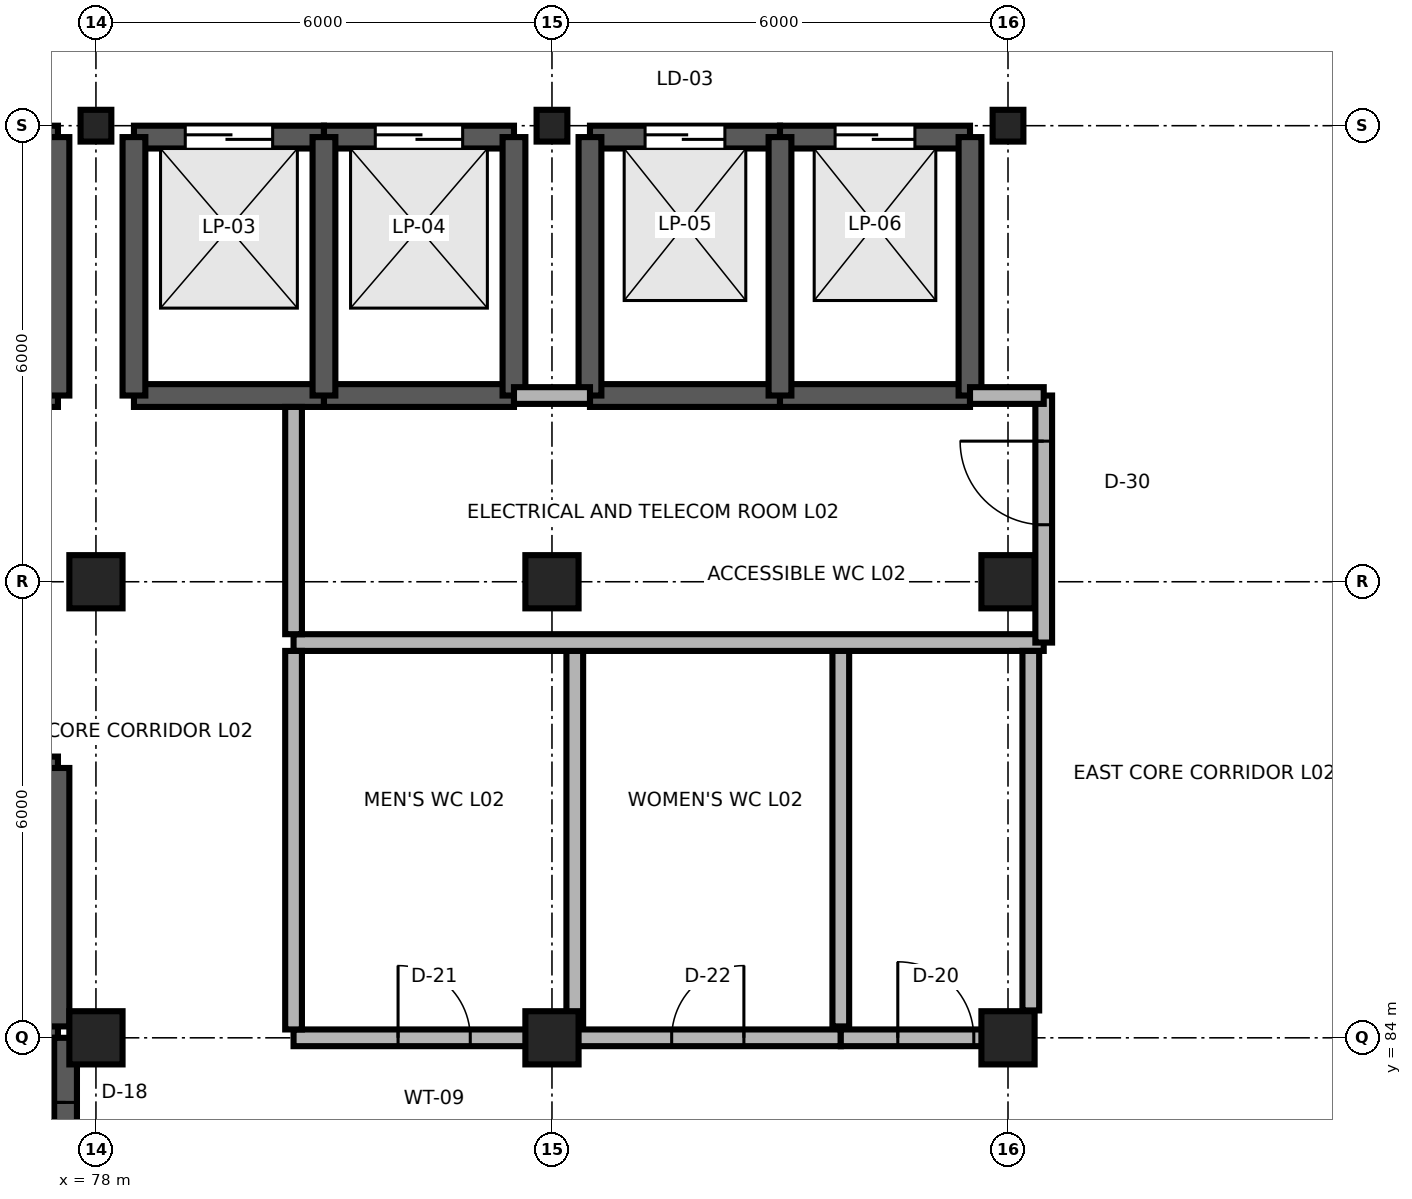
"""IFC4 building model, lengths in metres.
Left out: names, types, materials, properties, quantities, classifications, styles, units other than length and angle.
Written with IfcOpenShell. Run it as: python <this file> out.ifc"""

import sys

from ifc_helpers import new_model, si_unit, direction, frame, frame_2d, origin, origin_2d, place, context, subcontext, project, spatial, rectangle, i_section, extrude, element, fill, save


model = new_model("IFC4")
c1 = context("Model", 3, precision=1e-05, world=origin(), true_north=direction((0.0, 1.0)))
c2 = subcontext(c1, "Body", "Model", "MODEL_VIEW")
j1 = project(units=[si_unit("LENGTHUNIT", "METRE"), si_unit("PLANEANGLEUNIT", "RADIAN")], contexts=[c1])
p1 = place(None, origin())
s1 = spatial("IfcSite", under=j1, at=p1, CompositionType="ELEMENT")
p2 = place(p1, origin())
s2 = spatial("IfcBuilding", under=s1, at=p2, CompositionType="ELEMENT")
p3 = place(p2, frame((0.0, 0.0, 6.0)))
s3 = spatial("IfcBuildingStorey", under=s2, at=p3, CompositionType="ELEMENT", Elevation=6.0)
for number, where, z_axis, x_axis in (
    (1, (78.0, 84.0, 0.0), (0.0, 0.0, 1.0), (1.0, 0.0, 0.0)),
    (2, (84.0, 84.0, 0.0), (0.0, 0.0, 1.0), (1.0, 0.0, 0.0)),
    (3, (90.0, 84.0, 0.0), (0.0, 0.0, 1.0), (1.0, 0.0, 0.0)),
    (4, (78.0, 90.0, 0.0), (0.0, 0.0, 1.0), (1.0, 0.0, 0.0)),
    (5, (84.0, 90.0, 0.0), (0.0, 0.0, 1.0), (1.0, 0.0, 0.0)),
    (6, (90.0, 90.0, 0.0), (0.0, 0.0, 1.0), (1.0, 0.0, 0.0)),
):
    element("IfcColumn", number, at=place(p3, frame(where, z_axis=z_axis, x_axis=x_axis)), inside=s3, PredefinedType="COLUMN", context=c2, shape_type="SweptSolid", body=[
        extrude(rectangle(XDim=0.7, YDim=0.7, at=origin_2d()), origin(), (0.0, 0.0, 1.0), 6.0),
    ])
for number, where, z_axis, x_axis in (
    (7, (78.0, 96.0, 0.0), (0.0, 0.0, 1.0), (1.0, 0.0, 0.0)),
    (8, (84.0, 96.0, 0.0), (0.0, 0.0, 1.0), (1.0, 0.0, 0.0)),
    (9, (90.0, 96.0, 0.0), (0.0, 0.0, 1.0), (1.0, 0.0, 0.0)),
):
    element("IfcColumn", number, at=place(p3, frame(where, z_axis=z_axis, x_axis=x_axis)), inside=s3, PredefinedType="COLUMN", context=c2, shape_type="SweptSolid", body=[
        extrude(i_section(OverallWidth=0.405, OverallDepth=0.418, WebThickness=0.02, FlangeThickness=0.03, FilletRadius=0.022, at=origin_2d()), origin(), (0.0, 0.0, 1.0), 6.0),
    ])
p4 = place(p3, frame((75.0, 84.15, 0.0), z_axis=(0.0, 0.0, 1.0), x_axis=(1.0, 0.0, 0.0)))
e10 = element("IfcWall", 10, at=p4, inside=s3, PredefinedType="SHEAR", context=c2, shape_type="SweptSolid", body=[
    extrude(rectangle(XDim=2.5, YDim=0.3, at=frame_2d((1.25, 0.0))), origin(), (0.0, 0.0, 1.0), 5.76),
])
p5 = place(p4, frame((0.7, 0.0, 0.0)))
e11 = element("IfcOpeningElement", 11, at=p5, cuts=e10, PredefinedType="OPENING", context=c2, shape_type="SweptSolid", body=[
    extrude(rectangle(XDim=1.1, YDim=2.1, at=frame_2d((0.55, 1.05))), frame((0.0, 0.165, 0.0), z_axis=(0.0, -1.0, 0.0), x_axis=(1.0, 0.0, 0.0)), (0.0, 0.0, 1.0), 0.33),
])
p6 = place(p3, frame((75.0, 87.55, 0.0), z_axis=(0.0, 0.0, 1.0), x_axis=(1.0, 0.0, 0.0)))
e12 = element("IfcWall", 12, at=p6, inside=s3, PredefinedType="SHEAR", context=c2, shape_type="SweptSolid", body=[
    extrude(rectangle(XDim=2.5, YDim=0.3, at=frame_2d((1.25, 0.0))), origin(), (0.0, 0.0, 1.0), 5.76),
])
p7 = place(p3, frame((77.5, 84.15, 0.0), z_axis=(0.0, 0.0, 1.0), x_axis=(0.0, 1.0, 0.0)))
e13 = element("IfcWall", 13, at=p7, inside=s3, PredefinedType="SHEAR", context=c2, shape_type="SweptSolid", body=[
    extrude(rectangle(XDim=3.4, YDim=0.3, at=frame_2d((1.7, 0.0))), origin(), (0.0, 0.0, 1.0), 5.76),
])
p8 = place(p3, frame((75.0, 95.85, 0.0), z_axis=(0.0, 0.0, 1.0), x_axis=(1.0, 0.0, 0.0)))
e14 = element("IfcWall", 14, at=p8, inside=s3, PredefinedType="SHEAR", context=c2, shape_type="SweptSolid", body=[
    extrude(rectangle(XDim=2.5, YDim=0.3, at=frame_2d((1.25, 0.0))), origin(), (0.0, 0.0, 1.0), 5.76),
])
p9 = place(p8, frame((0.675, 0.0, 0.0)))
e15 = element("IfcOpeningElement", 15, at=p9, cuts=e14, PredefinedType="OPENING", context=c2, shape_type="SweptSolid", body=[
    extrude(rectangle(XDim=1.15, YDim=2.15, at=frame_2d((0.575, 1.075))), frame((0.0, 0.165, 0.0), z_axis=(0.0, -1.0, 0.0), x_axis=(1.0, 0.0, 0.0)), (0.0, 0.0, 1.0), 0.33),
])
p10 = place(p3, frame((75.0, 92.45, 0.0), z_axis=(0.0, 0.0, 1.0), x_axis=(1.0, 0.0, 0.0)))
e16 = element("IfcWall", 16, at=p10, inside=s3, PredefinedType="SHEAR", context=c2, shape_type="SweptSolid", body=[
    extrude(rectangle(XDim=2.5, YDim=0.3, at=frame_2d((1.25, 0.0))), origin(), (0.0, 0.0, 1.0), 5.76),
])
p11 = place(p3, frame((77.5, 92.45, 0.0), z_axis=(0.0, 0.0, 1.0), x_axis=(0.0, 1.0, 0.0)))
e17 = element("IfcWall", 17, at=p11, inside=s3, PredefinedType="SHEAR", context=c2, shape_type="SweptSolid", body=[
    extrude(rectangle(XDim=3.4, YDim=0.3, at=frame_2d((1.7, 0.0))), origin(), (0.0, 0.0, 1.0), 5.76),
])
p12 = place(p3, frame((78.5, 95.85, 0.0), z_axis=(0.0, 0.0, 1.0), x_axis=(1.0, 0.0, 0.0)))
e18 = element("IfcWall", 18, at=p12, inside=s3, PredefinedType="SHEAR", context=c2, shape_type="SweptSolid", body=[
    extrude(rectangle(XDim=2.5, YDim=0.3, at=frame_2d((1.25, 0.0))), origin(), (0.0, 0.0, 1.0), 5.76),
])
p13 = place(p12, frame((0.675, 0.0, 0.0)))
e19 = element("IfcOpeningElement", 19, at=p13, cuts=e18, PredefinedType="OPENING", context=c2, shape_type="SweptSolid", body=[
    extrude(rectangle(XDim=1.15, YDim=2.15, at=frame_2d((0.575, 1.075))), frame((0.0, 0.165, 0.0), z_axis=(0.0, -1.0, 0.0), x_axis=(1.0, 0.0, 0.0)), (0.0, 0.0, 1.0), 0.33),
])
p14 = place(p3, frame((78.5, 92.45, 0.0), z_axis=(0.0, 0.0, 1.0), x_axis=(1.0, 0.0, 0.0)))
e20 = element("IfcWall", 20, at=p14, inside=s3, PredefinedType="SHEAR", context=c2, shape_type="SweptSolid", body=[
    extrude(rectangle(XDim=2.5, YDim=0.3, at=frame_2d((1.25, 0.0))), origin(), (0.0, 0.0, 1.0), 5.76),
])
p15 = place(p3, frame((78.5, 92.45, 0.0), z_axis=(0.0, 0.0, 1.0), x_axis=(0.0, 1.0, 0.0)))
e21 = element("IfcWall", 21, at=p15, inside=s3, PredefinedType="SHEAR", context=c2, shape_type="SweptSolid", body=[
    extrude(rectangle(XDim=3.4, YDim=0.3, at=frame_2d((1.7, 0.0))), origin(), (0.0, 0.0, 1.0), 5.76),
])
p16 = place(p3, frame((81.0, 95.85, 0.0), z_axis=(0.0, 0.0, 1.0), x_axis=(1.0, 0.0, 0.0)))
e22 = element("IfcWall", 22, at=p16, inside=s3, PredefinedType="SHEAR", context=c2, shape_type="SweptSolid", body=[
    extrude(rectangle(XDim=2.5, YDim=0.3, at=frame_2d((1.25, 0.0))), origin(), (0.0, 0.0, 1.0), 5.76),
])
p17 = place(p16, frame((0.675, 0.0, 0.0)))
e23 = element("IfcOpeningElement", 23, at=p17, cuts=e22, PredefinedType="OPENING", context=c2, shape_type="SweptSolid", body=[
    extrude(rectangle(XDim=1.15, YDim=2.15, at=frame_2d((0.575, 1.075))), frame((0.0, 0.165, 0.0), z_axis=(0.0, -1.0, 0.0), x_axis=(1.0, 0.0, 0.0)), (0.0, 0.0, 1.0), 0.33),
])
p18 = place(p3, frame((81.0, 92.45, 0.0), z_axis=(0.0, 0.0, 1.0), x_axis=(1.0, 0.0, 0.0)))
e24 = element("IfcWall", 24, at=p18, inside=s3, PredefinedType="SHEAR", context=c2, shape_type="SweptSolid", body=[
    extrude(rectangle(XDim=2.5, YDim=0.3, at=frame_2d((1.25, 0.0))), origin(), (0.0, 0.0, 1.0), 5.76),
])
for number, where, z_axis, x_axis in (
    (25, (81.0, 92.45, 0.0), (0.0, 0.0, 1.0), (0.0, 1.0, 0.0)),
    (26, (83.5, 92.45, 0.0), (0.0, 0.0, 1.0), (0.0, 1.0, 0.0)),
):
    element("IfcWall", number, at=place(p3, frame(where, z_axis=z_axis, x_axis=x_axis)), inside=s3, PredefinedType="SHEAR", context=c2, shape_type="SweptSolid", body=[
        extrude(rectangle(XDim=3.4, YDim=0.3, at=frame_2d((1.7, 0.0))), origin(), (0.0, 0.0, 1.0), 5.76),
    ])
p19 = place(p3, frame((84.5, 95.85, 0.0), z_axis=(0.0, 0.0, 1.0), x_axis=(1.0, 0.0, 0.0)))
e27 = element("IfcWall", 27, at=p19, inside=s3, PredefinedType="SHEAR", context=c2, shape_type="SweptSolid", body=[
    extrude(rectangle(XDim=2.5, YDim=0.3, at=frame_2d((1.25, 0.0))), origin(), (0.0, 0.0, 1.0), 5.76),
])
p20 = place(p19, frame((0.725, 0.0, 0.0)))
e28 = element("IfcOpeningElement", 28, at=p20, cuts=e27, PredefinedType="OPENING", context=c2, shape_type="SweptSolid", body=[
    extrude(rectangle(XDim=1.05, YDim=2.1, at=frame_2d((0.525, 1.05))), frame((0.0, 0.165, 0.0), z_axis=(0.0, -1.0, 0.0), x_axis=(1.0, 0.0, 0.0)), (0.0, 0.0, 1.0), 0.33),
])
p21 = place(p3, frame((84.5, 92.45, 0.0), z_axis=(0.0, 0.0, 1.0), x_axis=(1.0, 0.0, 0.0)))
e29 = element("IfcWall", 29, at=p21, inside=s3, PredefinedType="SHEAR", context=c2, shape_type="SweptSolid", body=[
    extrude(rectangle(XDim=2.5, YDim=0.3, at=frame_2d((1.25, 0.0))), origin(), (0.0, 0.0, 1.0), 5.76),
])
p22 = place(p3, frame((84.5, 92.45, 0.0), z_axis=(0.0, 0.0, 1.0), x_axis=(0.0, 1.0, 0.0)))
e30 = element("IfcWall", 30, at=p22, inside=s3, PredefinedType="SHEAR", context=c2, shape_type="SweptSolid", body=[
    extrude(rectangle(XDim=3.4, YDim=0.3, at=frame_2d((1.7, 0.0))), origin(), (0.0, 0.0, 1.0), 5.76),
])
p23 = place(p3, frame((87.0, 95.85, 0.0), z_axis=(0.0, 0.0, 1.0), x_axis=(1.0, 0.0, 0.0)))
e31 = element("IfcWall", 31, at=p23, inside=s3, PredefinedType="SHEAR", context=c2, shape_type="SweptSolid", body=[
    extrude(rectangle(XDim=2.5, YDim=0.3, at=frame_2d((1.25, 0.0))), origin(), (0.0, 0.0, 1.0), 5.76),
])
p24 = place(p23, frame((0.725, 0.0, 0.0)))
e32 = element("IfcOpeningElement", 32, at=p24, cuts=e31, PredefinedType="OPENING", context=c2, shape_type="SweptSolid", body=[
    extrude(rectangle(XDim=1.05, YDim=2.1, at=frame_2d((0.525, 1.05))), frame((0.0, 0.165, 0.0), z_axis=(0.0, -1.0, 0.0), x_axis=(1.0, 0.0, 0.0)), (0.0, 0.0, 1.0), 0.33),
])
p25 = place(p3, frame((87.0, 92.45, 0.0), z_axis=(0.0, 0.0, 1.0), x_axis=(1.0, 0.0, 0.0)))
e33 = element("IfcWall", 33, at=p25, inside=s3, PredefinedType="SHEAR", context=c2, shape_type="SweptSolid", body=[
    extrude(rectangle(XDim=2.5, YDim=0.3, at=frame_2d((1.25, 0.0))), origin(), (0.0, 0.0, 1.0), 5.76),
])
for number, where, z_axis, x_axis in (
    (34, (87.0, 92.45, 0.0), (0.0, 0.0, 1.0), (0.0, 1.0, 0.0)),
    (35, (89.5, 92.45, 0.0), (0.0, 0.0, 1.0), (0.0, 1.0, 0.0)),
):
    element("IfcWall", number, at=place(p3, frame(where, z_axis=z_axis, x_axis=x_axis)), inside=s3, PredefinedType="SHEAR", context=c2, shape_type="SweptSolid", body=[
        extrude(rectangle(XDim=3.4, YDim=0.3, at=frame_2d((1.7, 0.0))), origin(), (0.0, 0.0, 1.0), 5.76),
    ])
p26 = place(p3, frame((77.6, 81.0, 0.0), z_axis=(0.0, 0.0, 1.0), x_axis=(0.0, 1.0, 0.0)))
e36 = element("IfcWall", 36, at=p26, inside=s3, PredefinedType="SHEAR", context=c2, shape_type="SweptSolid", body=[
    extrude(rectangle(XDim=3.0, YDim=0.3, at=frame_2d((1.5, 0.0))), origin(), (0.0, 0.0, 1.0), 5.76),
])
p27 = place(p26, frame((0.85, 0.0, 0.0)))
e37 = element("IfcOpeningElement", 37, at=p27, cuts=e36, PredefinedType="OPENING", context=c2, shape_type="SweptSolid", body=[
    extrude(rectangle(XDim=1.3, YDim=2.2, at=frame_2d((0.65, 1.1))), frame((0.0, 0.165, 0.0), z_axis=(0.0, -1.0, 0.0), x_axis=(1.0, 0.0, 0.0)), (0.0, 0.0, 1.0), 0.33),
])
p28 = place(p3, frame((80.6, 84.0, 0.0), z_axis=(0.0, 0.0, 1.0), x_axis=(1.0, 0.0, 0.0)))
e38 = element("IfcWall", 38, at=p28, inside=s3, PredefinedType="PARTITIONING", context=c2, shape_type="SweptSolid", body=[
    extrude(rectangle(XDim=3.7, YDim=0.22, at=frame_2d((1.85, 0.0))), origin(), (0.0, 0.0, 1.0), 5.32),
])
p29 = place(p28, frame((1.375, 0.0, 0.0)))
e39 = element("IfcOpeningElement", 39, at=p29, cuts=e38, PredefinedType="OPENING", context=c2, shape_type="SweptSolid", body=[
    extrude(rectangle(XDim=0.95, YDim=2.15, at=frame_2d((0.475, 1.075))), frame((0.0, 0.125, 0.0), z_axis=(0.0, -1.0, 0.0), x_axis=(1.0, 0.0, 0.0)), (0.0, 0.0, 1.0), 0.25),
])
p30 = place(p3, frame((84.3, 84.0, 0.0), z_axis=(0.0, 0.0, 1.0), x_axis=(1.0, 0.0, 0.0)))
e40 = element("IfcWall", 40, at=p30, inside=s3, PredefinedType="PARTITIONING", context=c2, shape_type="SweptSolid", body=[
    extrude(rectangle(XDim=3.5, YDim=0.22, at=frame_2d((1.75, 0.0))), origin(), (0.0, 0.0, 1.0), 5.32),
])
p31 = place(p30, frame((1.275, 0.0, 0.0)))
e41 = element("IfcOpeningElement", 41, at=p31, cuts=e40, PredefinedType="OPENING", context=c2, shape_type="SweptSolid", body=[
    extrude(rectangle(XDim=0.95, YDim=2.1, at=frame_2d((0.475, 1.05))), frame((0.0, 0.125, 0.0), z_axis=(0.0, -1.0, 0.0), x_axis=(1.0, 0.0, 0.0)), (0.0, 0.0, 1.0), 0.25),
])
p32 = place(p3, frame((87.8, 84.0, 0.0), z_axis=(0.0, 0.0, 1.0), x_axis=(1.0, 0.0, 0.0)))
e42 = element("IfcWall", 42, at=p32, inside=s3, PredefinedType="PARTITIONING", context=c2, shape_type="SweptSolid", body=[
    extrude(rectangle(XDim=2.5, YDim=0.22, at=frame_2d((1.25, 0.0))), origin(), (0.0, 0.0, 1.0), 5.32),
])
p33 = place(p32, frame((0.75, 0.0, 0.0)))
e43 = element("IfcOpeningElement", 43, at=p33, cuts=e42, PredefinedType="OPENING", context=c2, shape_type="SweptSolid", body=[
    extrude(rectangle(XDim=1.0, YDim=2.15, at=frame_2d((0.5, 1.075))), frame((0.0, 0.125, 0.0), z_axis=(0.0, -1.0, 0.0), x_axis=(1.0, 0.0, 0.0)), (0.0, 0.0, 1.0), 0.25),
])
for number, where, z_axis, x_axis in (
    (44, (84.3, 84.15, 0.0), (0.0, 0.0, 1.0), (0.0, 1.0, 0.0)),
    (45, (87.8, 84.15, 0.0), (0.0, 0.0, 1.0), (0.0, 1.0, 0.0)),
):
    element("IfcWall", number, at=place(p3, frame(where, z_axis=z_axis, x_axis=x_axis)), inside=s3, PredefinedType="PARTITIONING", context=c2, shape_type="SweptSolid", body=[
        extrude(rectangle(XDim=5.0, YDim=0.22, at=frame_2d((2.5, 0.0))), origin(), (0.0, 0.0, 1.0), 5.76),
    ])
p34 = place(p3, frame((80.6, 89.2, 0.0), z_axis=(0.0, 0.0, 1.0), x_axis=(1.0, 0.0, 0.0)))
e46 = element("IfcWall", 46, at=p34, inside=s3, PredefinedType="PARTITIONING", context=c2, shape_type="SweptSolid", body=[
    extrude(rectangle(XDim=9.87, YDim=0.22, at=frame_2d((4.935, 0.0))), origin(), (0.0, 0.0, 1.0), 5.76),
])
p35 = place(p3, frame((90.47, 89.2, 0.0), z_axis=(0.0, 0.0, 1.0), x_axis=(0.0, 1.0, 0.0)))
e47 = element("IfcWall", 47, at=p35, inside=s3, PredefinedType="PARTITIONING", context=c2, shape_type="SweptSolid", body=[
    extrude(rectangle(XDim=3.25, YDim=0.22, at=frame_2d((1.625, 0.0))), origin(), (0.0, 0.0, 1.0), 5.76),
])
p36 = place(p35, frame((1.55, 0.0, 0.0)))
e48 = element("IfcOpeningElement", 48, at=p36, cuts=e47, PredefinedType="OPENING", context=c2, shape_type="SweptSolid", body=[
    extrude(rectangle(XDim=1.1, YDim=2.15, at=frame_2d((0.55, 1.075))), frame((0.0, 0.125, 0.0), z_axis=(0.0, -1.0, 0.0), x_axis=(1.0, 0.0, 0.0)), (0.0, 0.0, 1.0), 0.25),
])
p37 = place(p3, frame((80.6, 84.11, 0.0), z_axis=(0.0, 0.0, 1.0), x_axis=(0.0, 1.0, 0.0)))
e49 = element("IfcWall", 49, at=p37, inside=s3, PredefinedType="PARTITIONING", context=c2, shape_type="SweptSolid", body=[
    extrude(rectangle(XDim=4.98, YDim=0.22, at=frame_2d((2.49, 0.0))), origin(), (0.0, 0.0, 1.0), 5.76),
])
p38 = place(p3, frame((90.3, 84.36, 0.0), z_axis=(0.0, 0.0, 1.0), x_axis=(0.0, 1.0, 0.0)))
e50 = element("IfcWall", 50, at=p38, inside=s3, PredefinedType="PARTITIONING", context=c2, shape_type="SweptSolid", body=[
    extrude(rectangle(XDim=4.73, YDim=0.22, at=frame_2d((2.365, 0.0))), origin(), (0.0, 0.0, 1.0), 5.76),
])
p39 = place(p3, frame((80.6, 89.31, 0.0), z_axis=(0.0, 0.0, 1.0), x_axis=(0.0, 1.0, 0.0)))
e51 = element("IfcWall", 51, at=p39, inside=s3, PredefinedType="PARTITIONING", context=c2, shape_type="SweptSolid", body=[
    extrude(rectangle(XDim=2.99, YDim=0.22, at=frame_2d((1.495, 0.0))), origin(), (0.0, 0.0, 1.0), 5.76),
])
p40 = place(p3, frame((83.5, 92.45, 0.0), z_axis=(0.0, 0.0, 1.0), x_axis=(1.0, 0.0, 0.0)))
e52 = element("IfcWall", 52, at=p40, inside=s3, PredefinedType="PARTITIONING", context=c2, shape_type="SweptSolid", body=[
    extrude(rectangle(XDim=1.0, YDim=0.22, at=frame_2d((0.5, 0.0))), origin(), (0.0, 0.0, 1.0), 5.76),
])
p41 = place(p3, frame((89.5, 92.45, 0.0), z_axis=(0.0, 0.0, 1.0), x_axis=(1.0, 0.0, 0.0)))
e53 = element("IfcWall", 53, at=p41, inside=s3, PredefinedType="PARTITIONING", context=c2, shape_type="SweptSolid", body=[
    extrude(rectangle(XDim=0.97, YDim=0.22, at=frame_2d((0.485, 0.0))), origin(), (0.0, 0.0, 1.0), 5.76),
])
p42 = place(p13, origin())
e54 = element("IfcDoor", 54, at=p42, inside=s3, OperationType="DOUBLE_DOOR_SLIDING", PredefinedType="DOOR", context=c2, shape_type="SweptSolid", body=[
    extrude(rectangle(XDim=1.15, YDim=2.15, at=frame_2d((0.575, 1.075))), frame((0.0, 0.025, 0.0), z_axis=(0.0, -1.0, 0.0), x_axis=(1.0, 0.0, 0.0)), (0.0, 0.0, 1.0), 0.05),
])
fill(e19, e54)
p43 = place(p17, origin())
e55 = element("IfcDoor", 55, at=p43, inside=s3, OperationType="DOUBLE_DOOR_SLIDING", PredefinedType="DOOR", context=c2, shape_type="SweptSolid", body=[
    extrude(rectangle(XDim=1.15, YDim=2.15, at=frame_2d((0.575, 1.075))), frame((0.0, 0.025, 0.0), z_axis=(0.0, -1.0, 0.0), x_axis=(1.0, 0.0, 0.0)), (0.0, 0.0, 1.0), 0.05),
])
fill(e23, e55)
p44 = place(p20, origin())
e56 = element("IfcDoor", 56, at=p44, inside=s3, OperationType="DOUBLE_DOOR_SLIDING", PredefinedType="DOOR", context=c2, shape_type="SweptSolid", body=[
    extrude(rectangle(XDim=1.05, YDim=2.1, at=frame_2d((0.525, 1.05))), frame((0.0, 0.025, 0.0), z_axis=(0.0, -1.0, 0.0), x_axis=(1.0, 0.0, 0.0)), (0.0, 0.0, 1.0), 0.05),
])
fill(e28, e56)
p45 = place(p24, origin())
e57 = element("IfcDoor", 57, at=p45, inside=s3, OperationType="DOUBLE_DOOR_SLIDING", PredefinedType="DOOR", context=c2, shape_type="SweptSolid", body=[
    extrude(rectangle(XDim=1.05, YDim=2.1, at=frame_2d((0.525, 1.05))), frame((0.0, 0.025, 0.0), z_axis=(0.0, -1.0, 0.0), x_axis=(1.0, 0.0, 0.0)), (0.0, 0.0, 1.0), 0.05),
])
fill(e32, e57)
p46 = place(p27, origin())
e58 = element("IfcDoor", 58, at=p46, inside=s3, OperationType="SINGLE_SWING_RIGHT", PredefinedType="DOOR", context=c2, shape_type="SweptSolid", body=[
    extrude(rectangle(XDim=1.3, YDim=2.2, at=frame_2d((0.65, 1.1))), frame((0.0, 0.025, 0.0), z_axis=(0.0, -1.0, 0.0), x_axis=(1.0, 0.0, 0.0)), (0.0, 0.0, 1.0), 0.05),
])
fill(e37, e58)
p47 = place(p29, origin())
e59 = element("IfcDoor", 59, at=p47, inside=s3, OperationType="SINGLE_SWING_LEFT", PredefinedType="DOOR", context=c2, shape_type="SweptSolid", body=[
    extrude(rectangle(XDim=0.95, YDim=2.15, at=frame_2d((0.475, 1.075))), frame((0.0, 0.025, 0.0), z_axis=(0.0, -1.0, 0.0), x_axis=(1.0, 0.0, 0.0)), (0.0, 0.0, 1.0), 0.05),
])
fill(e39, e59)
p48 = place(p31, origin())
e60 = element("IfcDoor", 60, at=p48, inside=s3, OperationType="SINGLE_SWING_RIGHT", PredefinedType="DOOR", context=c2, shape_type="SweptSolid", body=[
    extrude(rectangle(XDim=0.95, YDim=2.1, at=frame_2d((0.475, 1.05))), frame((0.0, 0.025, 0.0), z_axis=(0.0, -1.0, 0.0), x_axis=(1.0, 0.0, 0.0)), (0.0, 0.0, 1.0), 0.05),
])
fill(e41, e60)
p49 = place(p33, origin())
e61 = element("IfcDoor", 61, at=p49, inside=s3, OperationType="SINGLE_SWING_LEFT", PredefinedType="DOOR", context=c2, shape_type="SweptSolid", body=[
    extrude(rectangle(XDim=1.0, YDim=2.15, at=frame_2d((0.5, 1.075))), frame((0.0, 0.025, 0.0), z_axis=(0.0, -1.0, 0.0), x_axis=(1.0, 0.0, 0.0)), (0.0, 0.0, 1.0), 0.05),
])
fill(e43, e61)
p50 = place(p36, origin())
e62 = element("IfcDoor", 62, at=p50, inside=s3, OperationType="SINGLE_SWING_RIGHT", PredefinedType="DOOR", context=c2, shape_type="SweptSolid", body=[
    extrude(rectangle(XDim=1.1, YDim=2.15, at=frame_2d((0.55, 1.075))), frame((0.0, 0.025, 0.0), z_axis=(0.0, -1.0, 0.0), x_axis=(1.0, 0.0, 0.0)), (0.0, 0.0, 1.0), 0.05),
])
fill(e48, e62)
save(model, sys.argv[1])
